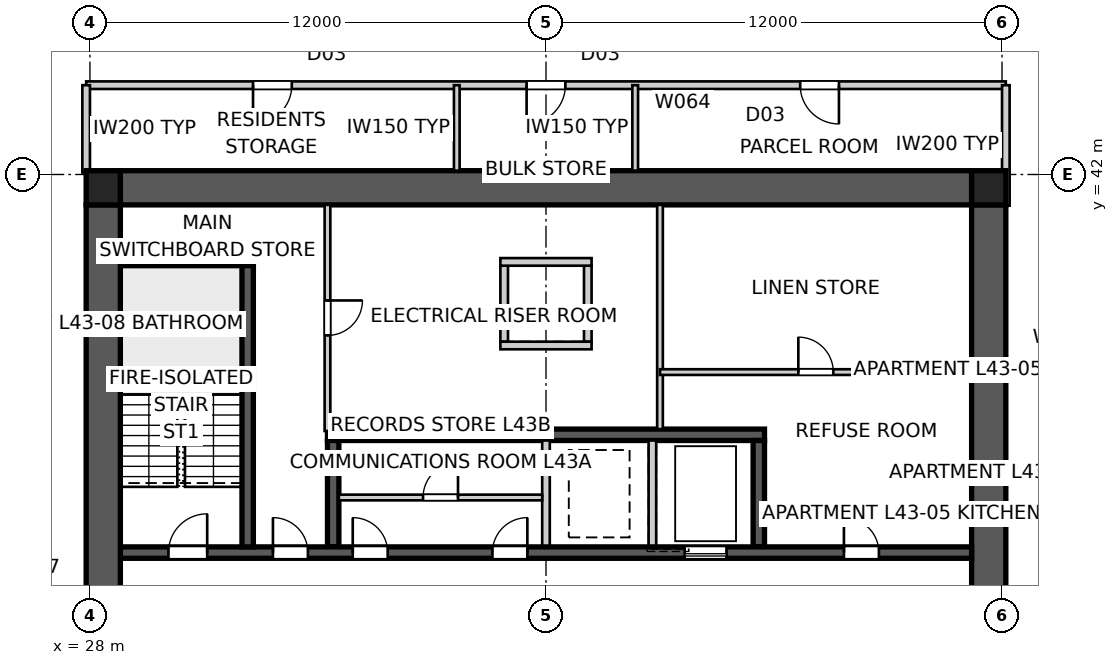
"""IFC4 building model, lengths in metres.
Left out: names, types, materials, properties, quantities, classifications, styles, units other than length and angle.
Written with IfcOpenShell. Run it as: python <this file> out.ifc"""

import sys

from ifc_helpers import new_model, si_unit, direction, frame, frame_2d, origin, origin_2d, place, context, subcontext, project, spatial, polyline, rectangle, outline, extrude, element, fill, save


model = new_model("IFC4")
c1 = context("Model", 3, precision=1e-05, world=origin(), true_north=direction((0.0, 1.0)))
c2 = subcontext(c1, "Body", "Model", "MODEL_VIEW")
j1 = project(units=[si_unit("LENGTHUNIT", "METRE"), si_unit("PLANEANGLEUNIT", "RADIAN")], contexts=[c1])
p1 = place(None, origin())
s1 = spatial("IfcSite", under=j1, at=p1, CompositionType="ELEMENT")
p2 = place(p1, origin())
s2 = spatial("IfcBuilding", under=s1, at=p2, CompositionType="ELEMENT")
p3 = place(p2, frame((0.0, 0.0, 157.4)))
s3 = spatial("IfcBuildingStorey", under=s2, at=p3, CompositionType="ELEMENT", Elevation=157.4)
p4 = place(p3, frame((28.8, 41.65, 0.0), z_axis=(0.0, 0.0, 1.0), x_axis=(1.0, 0.0, 0.0)))
e1 = element("IfcWall", 1, at=p4, inside=s3, PredefinedType="SHEAR", context=c2, shape_type="SweptSolid", body=[
    extrude(outline(polyline([(0.0, -0.45), (22.4, -0.45), (22.4, -0.025), (22.85, -0.025), (22.85, 0.025), (22.4, 0.025), (22.4, 0.45), (0.0, 0.45), (0.0, 0.025), (-0.45, 0.025), (-0.45, -0.025), (0.0, -0.025), (0.0, -0.45)])), origin(), (0.0, 0.0, 1.0), 3.4),
])
p5 = place(p3, frame((51.65, 18.8, 0.0), z_axis=(0.0, 0.0, 1.0), x_axis=(0.0, 1.0, 0.0)))
e2 = element("IfcWall", 2, at=p5, inside=s3, PredefinedType="SHEAR", context=c2, shape_type="SweptSolid", body=[
    extrude(outline(polyline([(0.0, -0.45), (22.4, -0.45), (22.4, -0.025), (22.85, -0.025), (22.85, 0.025), (22.4, 0.025), (22.4, 0.45), (0.0, 0.45), (0.0, 0.025), (-0.45, 0.025), (-0.45, -0.025), (0.0, -0.025), (0.0, -0.45)])), origin(), (0.0, 0.0, 1.0), 3.4),
])
p6 = place(p5, frame((11.14, 0.0, 0.0)))
e3 = element("IfcOpeningElement", 3, at=p6, cuts=e2, PredefinedType="OPENING", context=c2, shape_type="SweptSolid", body=[
    extrude(rectangle(XDim=1.02, YDim=2.4, at=frame_2d((0.51, 1.2))), frame((0.0, 0.46, 0.0), z_axis=(0.0, -1.0, 0.0), x_axis=(1.0, 0.0, 0.0)), (0.0, 0.0, 1.0), 0.92),
])
p7 = place(p3, frame((28.35, 41.2, 0.0), z_axis=(0.0, 0.0, 1.0), x_axis=(0.0, -1.0, 0.0)))
e4 = element("IfcWall", 4, at=p7, inside=s3, PredefinedType="SHEAR", context=c2, shape_type="SweptSolid", body=[
    extrude(outline(polyline([(0.0, -0.45), (22.4, -0.45), (22.4, -0.025), (22.85, -0.025), (22.85, 0.025), (22.4, 0.025), (22.4, 0.45), (0.0, 0.45), (0.0, 0.025), (-0.45, 0.025), (-0.45, -0.025), (0.0, -0.025), (0.0, -0.45)])), origin(), (0.0, 0.0, 1.0), 3.4),
])
p8 = place(p7, frame((11.14, 0.0, 0.0)))
e5 = element("IfcOpeningElement", 5, at=p8, cuts=e4, PredefinedType="OPENING", context=c2, shape_type="SweptSolid", body=[
    extrude(rectangle(XDim=1.02, YDim=2.4, at=frame_2d((0.51, 1.2))), frame((0.0, 0.46, 0.0), z_axis=(0.0, -1.0, 0.0), x_axis=(1.0, 0.0, 0.0)), (0.0, 0.0, 1.0), 0.92),
])
p9 = place(p3, frame((28.8, 32.05, 0.0), z_axis=(0.0, 0.0, 1.0), x_axis=(1.0, 0.0, 0.0)))
e6 = element("IfcWall", 6, at=p9, inside=s3, PredefinedType="SHEAR", context=c2, shape_type="SweptSolid", body=[
    extrude(rectangle(XDim=22.4, YDim=0.3, at=frame_2d((11.2, 0.0))), origin(), (0.0, 0.0, 1.0), 3.4),
])
p10 = place(p9, frame((19.04, 0.0, 0.0)))
e7 = element("IfcOpeningElement", 7, at=p10, cuts=e6, PredefinedType="OPENING", context=c2, shape_type="SweptSolid", body=[
    extrude(rectangle(XDim=0.92, YDim=2.1, at=frame_2d((0.46, 1.05))), frame((0.0, 0.16, 0.0), z_axis=(0.0, -1.0, 0.0), x_axis=(1.0, 0.0, 0.0)), (0.0, 0.0, 1.0), 0.32),
])
p11 = place(p9, frame((1.265, 0.0, 0.0)))
e8 = element("IfcOpeningElement", 8, at=p11, cuts=e6, PredefinedType="OPENING", context=c2, shape_type="SweptSolid", body=[
    extrude(rectangle(XDim=1.02, YDim=2.1, at=frame_2d((0.51, 1.05))), frame((0.0, 0.16, 0.0), z_axis=(0.0, -1.0, 0.0), x_axis=(1.0, 0.0, 0.0)), (0.0, 0.0, 1.0), 0.32),
])
p12 = place(p9, frame((4.015, 0.0, 0.0)))
e9 = element("IfcOpeningElement", 9, at=p12, cuts=e6, PredefinedType="OPENING", context=c2, shape_type="SweptSolid", body=[
    extrude(rectangle(XDim=0.92, YDim=2.1, at=frame_2d((0.46, 1.05))), frame((0.0, 0.16, 0.0), z_axis=(0.0, -1.0, 0.0), x_axis=(1.0, 0.0, 0.0)), (0.0, 0.0, 1.0), 0.32),
])
p13 = place(p9, frame((6.115, 0.0, 0.0)))
e10 = element("IfcOpeningElement", 10, at=p13, cuts=e6, PredefinedType="OPENING", context=c2, shape_type="SweptSolid", body=[
    extrude(rectangle(XDim=0.92, YDim=2.1, at=frame_2d((0.46, 1.05))), frame((0.0, 0.16, 0.0), z_axis=(0.0, -1.0, 0.0), x_axis=(1.0, 0.0, 0.0)), (0.0, 0.0, 1.0), 0.32),
])
p14 = place(p9, frame((9.79, 0.0, 0.0)))
e11 = element("IfcOpeningElement", 11, at=p14, cuts=e6, PredefinedType="OPENING", context=c2, shape_type="SweptSolid", body=[
    extrude(rectangle(XDim=0.92, YDim=2.1, at=frame_2d((0.46, 1.05))), frame((0.0, 0.16, 0.0), z_axis=(0.0, -1.0, 0.0), x_axis=(1.0, 0.0, 0.0)), (0.0, 0.0, 1.0), 0.32),
])
p15 = place(p9, frame((14.85, 0.0, 0.0)))
e12 = element("IfcOpeningElement", 12, at=p15, cuts=e6, PredefinedType="OPENING", context=c2, shape_type="SweptSolid", body=[
    extrude(rectangle(XDim=1.1, YDim=2.1, at=frame_2d((0.55, 1.05))), frame((0.0, 0.16, 0.0), z_axis=(0.0, -1.0, 0.0), x_axis=(1.0, 0.0, 0.0)), (0.0, 0.0, 1.0), 0.32),
])
p16 = place(p3, frame((34.25, 35.15, 0.0), z_axis=(0.0, 0.0, 1.0), x_axis=(1.0, 0.0, 0.0)))
e13 = element("IfcWall", 13, at=p16, inside=s3, PredefinedType="SHEAR", context=c2, shape_type="SweptSolid", body=[
    extrude(rectangle(XDim=11.5, YDim=0.3, at=frame_2d((5.75, 0.0))), origin(), (0.0, 0.0, 1.0), 3.4),
])
p17 = place(p3, frame((34.4, 32.2, 0.0), z_axis=(0.0, 0.0, 1.0), x_axis=(0.0, 1.0, 0.0)))
e14 = element("IfcWall", 14, at=p17, inside=s3, PredefinedType="SHEAR", context=c2, shape_type="SweptSolid", body=[
    extrude(rectangle(XDim=2.8, YDim=0.3, at=frame_2d((1.4, 0.0))), origin(), (0.0, 0.0, 1.0), 3.4),
])
for number, where, z_axis, x_axis in (
    (15, (40.0, 32.2, 0.0), (0.0, 0.0, 1.0), (0.0, 1.0, 0.0)),
    (16, (42.8, 32.2, 0.0), (0.0, 0.0, 1.0), (0.0, 1.0, 0.0)),
):
    element("IfcWall", number, at=place(p3, frame(where, z_axis=z_axis, x_axis=x_axis)), inside=s3, PredefinedType="SOLIDWALL", context=c2, shape_type="SweptSolid", body=[
        extrude(rectangle(XDim=2.8, YDim=0.2, at=frame_2d((1.4, 0.0))), origin(), (0.0, 0.0, 1.0), 3.4),
    ])
p18 = place(p3, frame((45.6, 32.2, 0.0), z_axis=(0.0, 0.0, 1.0), x_axis=(0.0, 1.0, 0.0)))
e17 = element("IfcWall", 17, at=p18, inside=s3, PredefinedType="SHEAR", context=c2, shape_type="SweptSolid", body=[
    extrude(rectangle(XDim=2.8, YDim=0.3, at=frame_2d((1.4, 0.0))), origin(), (0.0, 0.0, 1.0), 3.4),
])
p19 = place(p3, frame((32.15, 32.2, 0.0), z_axis=(0.0, 0.0, 1.0), x_axis=(0.0, 1.0, 0.0)))
e18 = element("IfcWall", 18, at=p19, inside=s3, PredefinedType="SHEAR", context=c2, shape_type="SweptSolid", body=[
    extrude(rectangle(XDim=7.7, YDim=0.3, at=frame_2d((3.85, 0.0))), origin(), (0.0, 0.0, 1.0), 3.4),
])
p20 = place(p3, frame((28.8, 39.75, 0.0), z_axis=(0.0, 0.0, 1.0), x_axis=(1.0, 0.0, 0.0)))
e19 = element("IfcWall", 19, at=p20, inside=s3, PredefinedType="SHEAR", context=c2, shape_type="SweptSolid", body=[
    extrude(rectangle(XDim=3.5, YDim=0.3, at=frame_2d((1.75, 0.0))), origin(), (0.0, 0.0, 1.0), 3.4),
])
for number, where, z_axis, x_axis in (
    (20, (38.9, 37.6, 0.0), (0.0, 0.0, 1.0), (0.0, 1.0, 0.0)),
    (21, (41.1, 37.6, 0.0), (0.0, 0.0, 1.0), (0.0, 1.0, 0.0)),
):
    element("IfcWall", number, at=place(p3, frame(where, z_axis=z_axis, x_axis=x_axis)), inside=s3, PredefinedType="SOLIDWALL", context=c2, shape_type="SweptSolid", body=[
        extrude(rectangle(XDim=2.0, YDim=0.2, at=frame_2d((1.0, 0.0))), origin(), (0.0, 0.0, 1.0), 3.4),
    ])
for number, where, z_axis, x_axis in (
    (22, (38.8, 37.5, 0.0), (0.0, 0.0, 1.0), (1.0, 0.0, 0.0)),
    (23, (38.8, 39.7, 0.0), (0.0, 0.0, 1.0), (1.0, 0.0, 0.0)),
):
    element("IfcWall", number, at=place(p3, frame(where, z_axis=z_axis, x_axis=x_axis)), inside=s3, PredefinedType="SOLIDWALL", context=c2, shape_type="SweptSolid", body=[
        extrude(rectangle(XDim=2.4, YDim=0.2, at=frame_2d((1.2, 0.0))), origin(), (0.0, 0.0, 1.0), 3.4),
    ])
for number, where, z_axis, x_axis in (
    (24, (51.65, 41.65, 0.0), (0.0, 0.0, 1.0), (1.0, 0.0, 0.0)),
    (25, (28.35, 41.65, 0.0), (0.0, 0.0, 1.0), (1.0, 0.0, 0.0)),
):
    element("IfcColumn", number, at=place(p3, frame(where, z_axis=z_axis, x_axis=x_axis)), inside=s3, PredefinedType="COLUMN", context=c2, shape_type="SweptSolid", body=[
        extrude(rectangle(XDim=0.9, YDim=0.9, at=origin_2d()), origin(), (0.0, 0.0, 1.0), 3.4),
    ])
p21 = place(p3, frame((34.25, 41.2, 0.0), z_axis=(0.0, 0.0, 1.0), x_axis=(0.0, -1.0, 0.0)))
e26 = element("IfcWall", 26, at=p21, inside=s3, PredefinedType="SOLIDWALL", context=c2, shape_type="SweptSolid", body=[
    extrude(rectangle(XDim=5.95, YDim=0.15, at=frame_2d((2.975, 0.0))), origin(), (0.0, 0.0, 1.0), 3.25),
])
p22 = place(p21, frame((2.515, 0.0, 0.0)))
e27 = element("IfcOpeningElement", 27, at=p22, cuts=e26, PredefinedType="OPENING", context=c2, shape_type="SweptSolid", body=[
    extrude(rectangle(XDim=0.92, YDim=2.1, at=frame_2d((0.46, 1.05))), frame((0.0, 0.085, 0.0), z_axis=(0.0, -1.0, 0.0), x_axis=(1.0, 0.0, 0.0)), (0.0, 0.0, 1.0), 0.17),
])
p23 = place(p3, frame((43.0, 41.2, 0.0), z_axis=(0.0, 0.0, 1.0), x_axis=(0.0, -1.0, 0.0)))
e28 = element("IfcWall", 28, at=p23, inside=s3, PredefinedType="SOLIDWALL", context=c2, shape_type="SweptSolid", body=[
    extrude(rectangle(XDim=5.9, YDim=0.15, at=frame_2d((2.95, 0.0))), origin(), (0.0, 0.0, 1.0), 3.25),
])
p24 = place(p3, frame((43.0, 36.8, 0.0), z_axis=(0.0, 0.0, 1.0), x_axis=(1.0, 0.0, 0.0)))
e29 = element("IfcWall", 29, at=p24, inside=s3, PredefinedType="SOLIDWALL", context=c2, shape_type="SweptSolid", body=[
    extrude(rectangle(XDim=8.2, YDim=0.15, at=frame_2d((4.1, 0.0))), origin(), (0.0, 0.0, 1.0), 3.25),
])
p25 = place(p24, frame((3.64, 0.0, 0.0)))
e30 = element("IfcOpeningElement", 30, at=p25, cuts=e29, PredefinedType="OPENING", context=c2, shape_type="SweptSolid", body=[
    extrude(rectangle(XDim=0.92, YDim=2.1, at=frame_2d((0.46, 1.05))), frame((0.0, 0.085, 0.0), z_axis=(0.0, -1.0, 0.0), x_axis=(1.0, 0.0, 0.0)), (0.0, 0.0, 1.0), 0.17),
])
p26 = place(p3, frame((52.1, 44.35, 0.0), z_axis=(0.0, 0.0, 1.0), x_axis=(-1.0, 0.0, 0.0)))
e31 = element("IfcWall", 31, at=p26, inside=s3, PredefinedType="PARTITIONING", context=c2, shape_type="SweptSolid", body=[
    extrude(rectangle(XDim=24.2, YDim=0.2, at=frame_2d((12.1, 0.0))), origin(), (0.0, 0.0, 1.0), 3.25),
])
p27 = place(p26, frame((18.789, 0.0, 0.0)))
e32 = element("IfcOpeningElement", 32, at=p27, cuts=e31, PredefinedType="OPENING", context=c2, shape_type="SweptSolid", body=[
    extrude(rectangle(XDim=1.02, YDim=2.1, at=frame_2d((0.51, 1.05))), frame((0.0, 0.11, 0.0), z_axis=(0.0, -1.0, 0.0), x_axis=(1.0, 0.0, 0.0)), (0.0, 0.0, 1.0), 0.22),
])
p28 = place(p26, frame((4.391, 0.0, 0.0)))
e33 = element("IfcOpeningElement", 33, at=p28, cuts=e31, PredefinedType="OPENING", context=c2, shape_type="SweptSolid", body=[
    extrude(rectangle(XDim=1.02, YDim=2.1, at=frame_2d((0.51, 1.05))), frame((0.0, 0.11, 0.0), z_axis=(0.0, -1.0, 0.0), x_axis=(1.0, 0.0, 0.0)), (0.0, 0.0, 1.0), 0.22),
])
p29 = place(p26, frame((11.59, 0.0, 0.0)))
e34 = element("IfcOpeningElement", 34, at=p29, cuts=e31, PredefinedType="OPENING", context=c2, shape_type="SweptSolid", body=[
    extrude(rectangle(XDim=1.02, YDim=2.1, at=frame_2d((0.51, 1.05))), frame((0.0, 0.11, 0.0), z_axis=(0.0, -1.0, 0.0), x_axis=(1.0, 0.0, 0.0)), (0.0, 0.0, 1.0), 0.22),
])
p30 = place(p3, frame((27.9, 44.35, 0.0), z_axis=(0.0, 0.0, 1.0), x_axis=(0.0, -1.0, 0.0)))
e35 = element("IfcWall", 35, at=p30, inside=s3, PredefinedType="PARTITIONING", context=c2, shape_type="SweptSolid", body=[
    extrude(rectangle(XDim=2.3, YDim=0.2, at=frame_2d((1.15, 0.0))), origin(), (0.0, 0.0, 1.0), 3.25),
])
p31 = place(p3, frame((52.1, 41.18, 0.0), z_axis=(0.0, 0.0, 1.0), x_axis=(0.0, 1.0, 0.0)))
e36 = element("IfcWall", 36, at=p31, inside=s3, PredefinedType="PARTITIONING", context=c2, shape_type="SweptSolid", body=[
    extrude(rectangle(XDim=3.17, YDim=0.2, at=frame_2d((1.585, 0.0))), origin(), (0.0, 0.0, 1.0), 3.25),
])
for number, where, z_axis, x_axis in (
    (37, (37.653, 42.1, 0.0), (0.0, 0.0, 1.0), (0.0, 1.0, 0.0)),
    (38, (42.347, 42.1, 0.0), (0.0, 0.0, 1.0), (0.0, 1.0, 0.0)),
):
    element("IfcWall", number, at=place(p3, frame(where, z_axis=z_axis, x_axis=x_axis)), inside=s3, PredefinedType="SOLIDWALL", context=c2, shape_type="SweptSolid", body=[
        extrude(rectangle(XDim=2.25, YDim=0.15, at=frame_2d((1.125, 0.0))), origin(), (0.0, 0.0, 1.0), 3.25),
    ])
p32 = place(p3, frame((34.55, 33.5, 0.0), z_axis=(0.0, 0.0, 1.0), x_axis=(1.0, 0.0, 0.0)))
e39 = element("IfcWall", 39, at=p32, inside=s3, PredefinedType="SOLIDWALL", context=c2, shape_type="SweptSolid", body=[
    extrude(rectangle(XDim=5.35, YDim=0.15, at=frame_2d((2.675, 0.0))), origin(), (0.0, 0.0, 1.0), 3.25),
])
p33 = place(p32, frame((2.215, 0.0, 0.0)))
e40 = element("IfcOpeningElement", 40, at=p33, cuts=e39, PredefinedType="OPENING", context=c2, shape_type="SweptSolid", body=[
    extrude(rectangle(XDim=0.92, YDim=2.1, at=frame_2d((0.46, 1.05))), frame((0.0, 0.085, 0.0), z_axis=(0.0, -1.0, 0.0), x_axis=(1.0, 0.0, 0.0)), (0.0, 0.0, 1.0), 0.17),
])
p34 = place(p10, origin())
e41 = element("IfcDoor", 41, at=p34, inside=s3, OperationType="SINGLE_SWING_LEFT", PredefinedType="DOOR", context=c2, shape_type="SweptSolid", body=[
    extrude(rectangle(XDim=0.92, YDim=2.1, at=frame_2d((0.46, 1.05))), frame((0.0, 0.025, 0.0), z_axis=(0.0, -1.0, 0.0), x_axis=(1.0, 0.0, 0.0)), (0.0, 0.0, 1.0), 0.05),
])
fill(e7, e41)
p35 = place(p11, origin())
e42 = element("IfcDoor", 42, at=p35, inside=s3, OperationType="SINGLE_SWING_RIGHT", PredefinedType="DOOR", context=c2, shape_type="SweptSolid", body=[
    extrude(rectangle(XDim=1.02, YDim=2.1, at=frame_2d((0.51, 1.05))), frame((0.0, 0.025, 0.0), z_axis=(0.0, -1.0, 0.0), x_axis=(1.0, 0.0, 0.0)), (0.0, 0.0, 1.0), 0.05),
])
fill(e8, e42)
p36 = place(p12, origin())
e43 = element("IfcDoor", 43, at=p36, inside=s3, OperationType="SINGLE_SWING_LEFT", PredefinedType="DOOR", context=c2, shape_type="SweptSolid", body=[
    extrude(rectangle(XDim=0.92, YDim=2.1, at=frame_2d((0.46, 1.05))), frame((0.0, 0.025, 0.0), z_axis=(0.0, -1.0, 0.0), x_axis=(1.0, 0.0, 0.0)), (0.0, 0.0, 1.0), 0.05),
])
fill(e9, e43)
p37 = place(p27, origin())
e44 = element("IfcDoor", 44, at=p37, inside=s3, OperationType="SINGLE_SWING_RIGHT", PredefinedType="DOOR", context=c2, shape_type="SweptSolid", body=[
    extrude(rectangle(XDim=1.02, YDim=2.1, at=frame_2d((0.51, 1.05))), frame((0.0, 0.025, 0.0), z_axis=(0.0, -1.0, 0.0), x_axis=(1.0, 0.0, 0.0)), (0.0, 0.0, 1.0), 0.05),
])
fill(e32, e44)
p38 = place(p28, origin())
e45 = element("IfcDoor", 45, at=p38, inside=s3, OperationType="SINGLE_SWING_LEFT", PredefinedType="DOOR", context=c2, shape_type="SweptSolid", body=[
    extrude(rectangle(XDim=1.02, YDim=2.1, at=frame_2d((0.51, 1.05))), frame((0.0, 0.025, 0.0), z_axis=(0.0, -1.0, 0.0), x_axis=(1.0, 0.0, 0.0)), (0.0, 0.0, 1.0), 0.05),
])
fill(e33, e45)
p39 = place(p29, origin())
e46 = element("IfcDoor", 46, at=p39, inside=s3, OperationType="SINGLE_SWING_RIGHT", PredefinedType="DOOR", context=c2, shape_type="SweptSolid", body=[
    extrude(rectangle(XDim=1.02, YDim=2.1, at=frame_2d((0.51, 1.05))), frame((0.0, 0.025, 0.0), z_axis=(0.0, -1.0, 0.0), x_axis=(1.0, 0.0, 0.0)), (0.0, 0.0, 1.0), 0.05),
])
fill(e34, e46)
p40 = place(p25, origin())
e47 = element("IfcDoor", 47, at=p40, inside=s3, OperationType="SINGLE_SWING_LEFT", PredefinedType="DOOR", context=c2, shape_type="SweptSolid", body=[
    extrude(rectangle(XDim=0.92, YDim=2.1, at=frame_2d((0.46, 1.05))), frame((0.0, 0.025, 0.0), z_axis=(0.0, -1.0, 0.0), x_axis=(1.0, 0.0, 0.0)), (0.0, 0.0, 1.0), 0.05),
])
fill(e30, e47)
p41 = place(p22, origin())
e48 = element("IfcDoor", 48, at=p41, inside=s3, OperationType="SINGLE_SWING_LEFT", PredefinedType="DOOR", context=c2, shape_type="SweptSolid", body=[
    extrude(rectangle(XDim=0.92, YDim=2.1, at=frame_2d((0.46, 1.05))), frame((0.0, 0.025, 0.0), z_axis=(0.0, -1.0, 0.0), x_axis=(1.0, 0.0, 0.0)), (0.0, 0.0, 1.0), 0.05),
])
fill(e27, e48)
p42 = place(p13, origin())
e49 = element("IfcDoor", 49, at=p42, inside=s3, OperationType="SINGLE_SWING_LEFT", PredefinedType="DOOR", context=c2, shape_type="SweptSolid", body=[
    extrude(rectangle(XDim=0.92, YDim=2.1, at=frame_2d((0.46, 1.05))), frame((0.0, 0.025, 0.0), z_axis=(0.0, -1.0, 0.0), x_axis=(1.0, 0.0, 0.0)), (0.0, 0.0, 1.0), 0.05),
])
fill(e10, e49)
p43 = place(p14, origin())
e50 = element("IfcDoor", 50, at=p43, inside=s3, OperationType="SINGLE_SWING_RIGHT", PredefinedType="DOOR", context=c2, shape_type="SweptSolid", body=[
    extrude(rectangle(XDim=0.92, YDim=2.1, at=frame_2d((0.46, 1.05))), frame((0.0, 0.025, 0.0), z_axis=(0.0, -1.0, 0.0), x_axis=(1.0, 0.0, 0.0)), (0.0, 0.0, 1.0), 0.05),
])
fill(e11, e50)
p44 = place(p33, origin())
e51 = element("IfcDoor", 51, at=p44, inside=s3, OperationType="SINGLE_SWING_RIGHT", PredefinedType="DOOR", context=c2, shape_type="SweptSolid", body=[
    extrude(rectangle(XDim=0.92, YDim=2.1, at=frame_2d((0.46, 1.05))), frame((0.0, 0.025, 0.0), z_axis=(0.0, -1.0, 0.0), x_axis=(1.0, 0.0, 0.0)), (0.0, 0.0, 1.0), 0.05),
])
fill(e40, e51)
p45 = place(p15, origin())
e52 = element("IfcDoor", 52, at=p45, inside=s3, OperationType="SLIDING_TO_LEFT", PredefinedType="DOOR", context=c2, shape_type="SweptSolid", body=[
    extrude(rectangle(XDim=1.1, YDim=2.1, at=frame_2d((0.55, 1.05))), frame((0.0, 0.025, 0.0), z_axis=(0.0, -1.0, 0.0), x_axis=(1.0, 0.0, 0.0)), (0.0, 0.0, 1.0), 0.05),
])
fill(e12, e52)
save(model, sys.argv[1])
